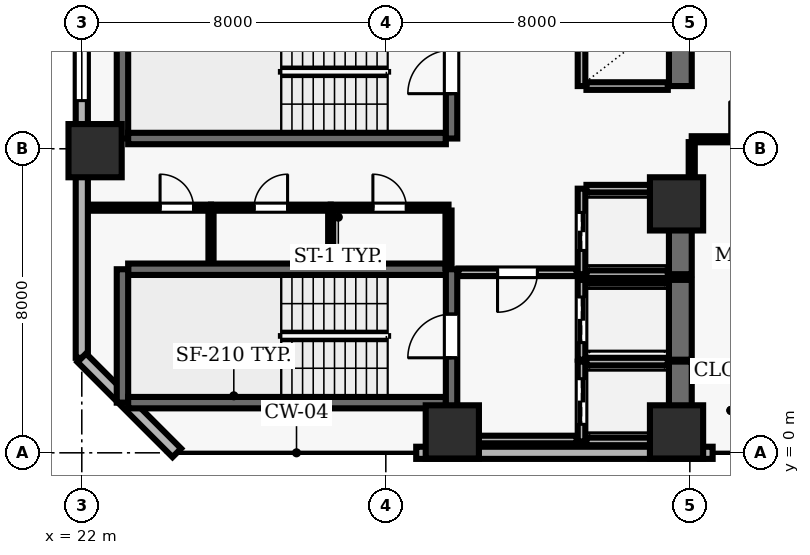
"""IFC4 building model, lengths in metres.
Left out: names, types, materials, properties, quantities, classifications, styles, units other than length and angle.
Written with IfcOpenShell. Run it as: python <this file> out.ifc"""

import sys

from ifc_helpers import new_model, si_unit, direction, frame, frame_2d, origin, origin_2d, place, context, subcontext, project, spatial, rectangle, extrude, element, fill, save


model = new_model("IFC4")
c1 = context("Model", 3, precision=1e-05, world=origin(), true_north=direction((0.0, 1.0)))
c2 = subcontext(c1, "Body", "Model", "MODEL_VIEW")
j1 = project(units=[si_unit("LENGTHUNIT", "METRE"), si_unit("PLANEANGLEUNIT", "RADIAN")], contexts=[c1])
p1 = place(None, origin())
s1 = spatial("IfcSite", under=j1, at=p1, CompositionType="ELEMENT")
p2 = place(p1, origin())
s2 = spatial("IfcBuilding", under=s1, at=p2, CompositionType="ELEMENT")
p3 = place(p2, frame((0.0, 0.0, 85.6)))
s3 = spatial("IfcBuildingStorey", under=s2, at=p3, CompositionType="ELEMENT", Elevation=85.6)
for number, where, z_axis, x_axis in (
    (1, (31.75, 0.55, 0.0), (0.0, 0.0, 1.0), (1.0, 0.0, 0.0)),
    (2, (37.65, 0.55, 0.0), (0.0, 0.0, 1.0), (1.0, 0.0, 0.0)),
    (3, (22.35, 7.95, 0.0), (0.0, 0.0, 1.0), (1.0, 0.0, 0.0)),
    (4, (37.65, 6.55, 0.0), (0.0, 0.0, 1.0), (1.0, 0.0, 0.0)),
):
    element("IfcColumn", number, at=place(p3, frame(where, z_axis=z_axis, x_axis=x_axis)), inside=s3, PredefinedType="COLUMN", context=c2, shape_type="SweptSolid", body=[
        extrude(rectangle(XDim=1.4, YDim=1.4, at=origin_2d()), origin(), (0.0, 0.0, 1.0), 3.9),
    ])
p4 = place(p3, frame((30.8, 0.0, 0.0), z_axis=(0.0, 0.0, 1.0), x_axis=(1.0, 0.0, 0.0)))
e5 = element("IfcWall", 5, at=p4, inside=s3, PredefinedType="SOLIDWALL", context=c2, shape_type="SweptSolid", body=[
    extrude(rectangle(XDim=7.8, YDim=0.32, at=frame_2d((3.9, 0.0))), origin(), (0.0, 0.0, 1.0), 3.69),
])
p5 = place(p3, frame((22.0, 51.5, 0.0), z_axis=(0.0, 0.0, 1.0), x_axis=(0.0, -1.0, 0.0)))
e6 = element("IfcWall", 6, at=p5, inside=s3, PredefinedType="SOLIDWALL", context=c2, shape_type="SweptSolid", body=[
    extrude(rectangle(XDim=49.0, YDim=0.32, at=frame_2d((24.5, 0.0))), origin(), (0.0, 0.0, 1.0), 3.69),
])
p6 = place(p5, frame((12.1, 0.0, 0.0)))
e7 = element("IfcOpeningElement", 7, at=p6, cuts=e6, PredefinedType="OPENING", context=c2, shape_type="SweptSolid", body=[
    extrude(rectangle(XDim=1.0, YDim=2.2, at=frame_2d((0.5, 1.1))), frame((0.0, 0.17, 0.0), z_axis=(0.0, -1.0, 0.0), x_axis=(1.0, 0.0, 0.0)), (0.0, 0.0, 1.0), 0.34),
])
p7 = place(p5, frame((1.322, 0.0, 0.9)))
e8 = element("IfcOpeningElement", 8, at=p7, cuts=e6, PredefinedType="OPENING", context=c2, shape_type="SweptSolid", body=[
    extrude(rectangle(XDim=2.8, YDim=1.8, at=frame_2d((1.4, 0.9))), frame((0.0, 0.17, 0.0), z_axis=(0.0, -1.0, 0.0), x_axis=(1.0, 0.0, 0.0)), (0.0, 0.0, 1.0), 0.34),
])
p8 = place(p5, frame((17.656, 0.0, 0.9)))
e9 = element("IfcOpeningElement", 9, at=p8, cuts=e6, PredefinedType="OPENING", context=c2, shape_type="SweptSolid", body=[
    extrude(rectangle(XDim=2.8, YDim=1.8, at=frame_2d((1.4, 0.9))), frame((0.0, 0.17, 0.0), z_axis=(0.0, -1.0, 0.0), x_axis=(1.0, 0.0, 0.0)), (0.0, 0.0, 1.0), 0.34),
])
p9 = place(p5, frame((28.994, 0.0, 0.9)))
e10 = element("IfcOpeningElement", 10, at=p9, cuts=e6, PredefinedType="OPENING", context=c2, shape_type="SweptSolid", body=[
    extrude(rectangle(XDim=2.8, YDim=1.8, at=frame_2d((1.4, 0.9))), frame((0.0, 0.17, 0.0), z_axis=(0.0, -1.0, 0.0), x_axis=(1.0, 0.0, 0.0)), (0.0, 0.0, 1.0), 0.34),
])
p10 = place(p5, frame((33.089, 0.0, 0.9)))
e11 = element("IfcOpeningElement", 11, at=p10, cuts=e6, PredefinedType="OPENING", context=c2, shape_type="SweptSolid", body=[
    extrude(rectangle(XDim=2.8, YDim=1.8, at=frame_2d((1.4, 0.9))), frame((0.0, 0.17, 0.0), z_axis=(0.0, -1.0, 0.0), x_axis=(1.0, 0.0, 0.0)), (0.0, 0.0, 1.0), 0.34),
])
p11 = place(p5, frame((39.433, 0.0, 0.9)))
e12 = element("IfcOpeningElement", 12, at=p11, cuts=e6, PredefinedType="OPENING", context=c2, shape_type="SweptSolid", body=[
    extrude(rectangle(XDim=2.8, YDim=1.8, at=frame_2d((1.4, 0.9))), frame((0.0, 0.17, 0.0), z_axis=(0.0, -1.0, 0.0), x_axis=(1.0, 0.0, 0.0)), (0.0, 0.0, 1.0), 0.34),
])
p12 = place(p3, frame((22.0, 2.5, 0.0), z_axis=(0.0, 0.0, 1.0), x_axis=(0.707106781187, -0.707106781187, 0.0)))
e13 = element("IfcWall", 13, at=p12, inside=s3, PredefinedType="SOLIDWALL", context=c2, shape_type="SweptSolid", body=[
    extrude(rectangle(XDim=3.536, YDim=0.32, at=frame_2d((1.768, 0.0))), origin(), (0.0, 0.0, 1.0), 3.69),
])
p13 = place(p3, frame((31.58, 4.83, 0.0), z_axis=(0.0, 0.0, 1.0), x_axis=(-1.0, 0.0, 0.0)))
e14 = element("IfcWall", 14, at=p13, inside=s3, PredefinedType="SHEAR", context=c2, shape_type="SweptSolid", body=[
    extrude(rectangle(XDim=8.36, YDim=0.3, at=frame_2d((4.18, 0.0))), origin(), (0.0, 0.0, 1.0), 3.69),
])
p14 = place(p3, frame((23.07, 4.83, 0.0), z_axis=(0.0, 0.0, 1.0), x_axis=(0.0, -1.0, 0.0)))
e15 = element("IfcWall", 15, at=p14, inside=s3, PredefinedType="SHEAR", context=c2, shape_type="SweptSolid", body=[
    extrude(rectangle(XDim=3.51, YDim=0.3, at=frame_2d((1.755, 0.0))), origin(), (0.0, 0.0, 1.0), 3.69),
])
p15 = place(p3, frame((23.22, 1.32, 0.0), z_axis=(0.0, 0.0, 1.0), x_axis=(1.0, 0.0, 0.0)))
e16 = element("IfcWall", 16, at=p15, inside=s3, PredefinedType="SHEAR", context=c2, shape_type="SweptSolid", body=[
    extrude(rectangle(XDim=8.36, YDim=0.3, at=frame_2d((4.18, 0.0))), origin(), (0.0, 0.0, 1.0), 3.69),
])
p16 = place(p3, frame((31.73, 0.96, 0.0), z_axis=(0.0, 0.0, 1.0), x_axis=(0.0, 1.0, 0.0)))
e17 = element("IfcWall", 17, at=p16, inside=s3, PredefinedType="SHEAR", context=c2, shape_type="SweptSolid", body=[
    extrude(rectangle(XDim=3.87, YDim=0.3, at=frame_2d((1.935, 0.0))), origin(), (0.0, 0.0, 1.0), 3.69),
])
p17 = place(p16, frame((1.54, 0.0, 0.0)))
e18 = element("IfcOpeningElement", 18, at=p17, cuts=e17, PredefinedType="OPENING", context=c2, shape_type="SweptSolid", body=[
    extrude(rectangle(XDim=1.15, YDim=2.15, at=frame_2d((0.575, 1.075))), frame((0.0, 0.16, 0.0), z_axis=(0.0, -1.0, 0.0), x_axis=(1.0, 0.0, 0.0)), (0.0, 0.0, 1.0), 0.32),
])
p18 = place(p3, frame((23.07, 11.78, 0.0), z_axis=(0.0, 0.0, 1.0), x_axis=(0.0, -1.0, 0.0)))
e19 = element("IfcWall", 19, at=p18, inside=s3, PredefinedType="SHEAR", context=c2, shape_type="SweptSolid", body=[
    extrude(rectangle(XDim=3.51, YDim=0.3, at=frame_2d((1.755, 0.0))), origin(), (0.0, 0.0, 1.0), 3.69),
])
p19 = place(p3, frame((23.22, 8.27, 0.0), z_axis=(0.0, 0.0, 1.0), x_axis=(1.0, 0.0, 0.0)))
e20 = element("IfcWall", 20, at=p19, inside=s3, PredefinedType="SHEAR", context=c2, shape_type="SweptSolid", body=[
    extrude(rectangle(XDim=8.36, YDim=0.3, at=frame_2d((4.18, 0.0))), origin(), (0.0, 0.0, 1.0), 3.69),
])
p20 = place(p3, frame((31.73, 8.27, 0.0), z_axis=(0.0, 0.0, 1.0), x_axis=(0.0, 1.0, 0.0)))
e21 = element("IfcWall", 21, at=p20, inside=s3, PredefinedType="SHEAR", context=c2, shape_type="SweptSolid", body=[
    extrude(rectangle(XDim=3.51, YDim=0.3, at=frame_2d((1.755, 0.0))), origin(), (0.0, 0.0, 1.0), 3.69),
])
p21 = place(p20, frame((1.18, 0.0, 0.0)))
e22 = element("IfcOpeningElement", 22, at=p21, cuts=e21, PredefinedType="OPENING", context=c2, shape_type="SweptSolid", body=[
    extrude(rectangle(XDim=1.15, YDim=2.15, at=frame_2d((0.575, 1.075))), frame((0.0, 0.16, 0.0), z_axis=(0.0, -1.0, 0.0), x_axis=(1.0, 0.0, 0.0)), (0.0, 0.0, 1.0), 0.32),
])
p22 = place(p3, frame((35.15, 2.4, 0.0), z_axis=(0.0, 0.0, 1.0), x_axis=(0.0, -1.0, 0.0)))
e23 = element("IfcWall", 23, at=p22, inside=s3, PredefinedType="SOLIDWALL", context=c2, shape_type="SweptSolid", body=[
    extrude(rectangle(XDim=2.1, YDim=0.2, at=frame_2d((1.05, 0.0))), origin(), (0.0, 0.0, 1.0), 3.69),
])
p23 = place(p22, frame((0.45, 0.0, 0.0)))
e24 = element("IfcOpeningElement", 24, at=p23, cuts=e23, PredefinedType="OPENING", context=c2, shape_type="SweptSolid", body=[
    extrude(rectangle(XDim=1.2, YDim=2.15, at=frame_2d((0.6, 1.075))), frame((0.0, 0.11, 0.0), z_axis=(0.0, -1.0, 0.0), x_axis=(1.0, 0.0, 0.0)), (0.0, 0.0, 1.0), 0.22),
])
p24 = place(p3, frame((37.75, 0.3, 0.0), z_axis=(0.0, 0.0, 1.0), x_axis=(0.0, 1.0, 0.0)))
e25 = element("IfcWall", 25, at=p24, inside=s3, PredefinedType="SHEAR", context=c2, shape_type="SweptSolid", body=[
    extrude(rectangle(XDim=2.1, YDim=0.6, at=frame_2d((1.05, 0.0))), origin(), (0.0, 0.0, 1.0), 3.69),
])
for number, where, z_axis, x_axis in (
    (26, (35.28, 0.3, 0.0), (0.0, 0.0, 1.0), (1.0, 0.0, 0.0)),
    (27, (37.42, 2.4, 0.0), (0.0, 0.0, 1.0), (-1.0, 0.0, 0.0)),
):
    element("IfcWall", number, at=place(p3, frame(where, z_axis=z_axis, x_axis=x_axis)), inside=s3, PredefinedType="SOLIDWALL", context=c2, shape_type="SweptSolid", body=[
        extrude(rectangle(XDim=2.14, YDim=0.2, at=frame_2d((1.07, 0.0))), origin(), (0.0, 0.0, 1.0), 3.69),
    ])
p25 = place(p3, frame((35.15, 4.55, 0.0), z_axis=(0.0, 0.0, 1.0), x_axis=(0.0, -1.0, 0.0)))
e28 = element("IfcWall", 28, at=p25, inside=s3, PredefinedType="SOLIDWALL", context=c2, shape_type="SweptSolid", body=[
    extrude(rectangle(XDim=2.1, YDim=0.2, at=frame_2d((1.05, 0.0))), origin(), (0.0, 0.0, 1.0), 3.69),
])
p26 = place(p25, frame((0.45, 0.0, 0.0)))
e29 = element("IfcOpeningElement", 29, at=p26, cuts=e28, PredefinedType="OPENING", context=c2, shape_type="SweptSolid", body=[
    extrude(rectangle(XDim=1.2, YDim=2.15, at=frame_2d((0.6, 1.075))), frame((0.0, 0.11, 0.0), z_axis=(0.0, -1.0, 0.0), x_axis=(1.0, 0.0, 0.0)), (0.0, 0.0, 1.0), 0.22),
])
p27 = place(p3, frame((37.75, 2.45, 0.0), z_axis=(0.0, 0.0, 1.0), x_axis=(0.0, 1.0, 0.0)))
e30 = element("IfcWall", 30, at=p27, inside=s3, PredefinedType="SHEAR", context=c2, shape_type="SweptSolid", body=[
    extrude(rectangle(XDim=2.1, YDim=0.6, at=frame_2d((1.05, 0.0))), origin(), (0.0, 0.0, 1.0), 3.69),
])
p28 = place(p3, frame((37.42, 4.55, 0.0), z_axis=(0.0, 0.0, 1.0), x_axis=(-1.0, 0.0, 0.0)))
e31 = element("IfcWall", 31, at=p28, inside=s3, PredefinedType="SOLIDWALL", context=c2, shape_type="SweptSolid", body=[
    extrude(rectangle(XDim=2.14, YDim=0.2, at=frame_2d((1.07, 0.0))), origin(), (0.0, 0.0, 1.0), 3.69),
])
p29 = place(p3, frame((35.15, 6.95, 0.0), z_axis=(0.0, 0.0, 1.0), x_axis=(0.0, -1.0, 0.0)))
e32 = element("IfcWall", 32, at=p29, inside=s3, PredefinedType="SOLIDWALL", context=c2, shape_type="SweptSolid", body=[
    extrude(rectangle(XDim=2.25, YDim=0.2, at=frame_2d((1.125, 0.0))), origin(), (0.0, 0.0, 1.0), 3.69),
])
p30 = place(p29, frame((0.625, 0.0, 0.0)))
e33 = element("IfcOpeningElement", 33, at=p30, cuts=e32, PredefinedType="OPENING", context=c2, shape_type="SweptSolid", body=[
    extrude(rectangle(XDim=1.0, YDim=2.1, at=frame_2d((0.5, 1.05))), frame((0.0, 0.11, 0.0), z_axis=(0.0, -1.0, 0.0), x_axis=(1.0, 0.0, 0.0)), (0.0, 0.0, 1.0), 0.22),
])
p31 = place(p3, frame((37.75, 4.7, 0.0), z_axis=(0.0, 0.0, 1.0), x_axis=(0.0, 1.0, 0.0)))
e34 = element("IfcWall", 34, at=p31, inside=s3, PredefinedType="SHEAR", context=c2, shape_type="SweptSolid", body=[
    extrude(rectangle(XDim=2.25, YDim=0.6, at=frame_2d((1.125, 0.0))), origin(), (0.0, 0.0, 1.0), 3.69),
])
for number, where, z_axis, x_axis in (
    (35, (35.28, 4.7, 0.0), (0.0, 0.0, 1.0), (1.0, 0.0, 0.0)),
    (36, (37.42, 6.95, 0.0), (0.0, 0.0, 1.0), (-1.0, 0.0, 0.0)),
):
    element("IfcWall", number, at=place(p3, frame(where, z_axis=z_axis, x_axis=x_axis)), inside=s3, PredefinedType="SOLIDWALL", context=c2, shape_type="SweptSolid", body=[
        extrude(rectangle(XDim=2.14, YDim=0.2, at=frame_2d((1.07, 0.0))), origin(), (0.0, 0.0, 1.0), 3.69),
    ])
p32 = place(p3, frame((35.15, 11.55, 0.0), z_axis=(0.0, 0.0, 1.0), x_axis=(0.0, -1.0, 0.0)))
e37 = element("IfcWall", 37, at=p32, inside=s3, PredefinedType="SOLIDWALL", context=c2, shape_type="SweptSolid", body=[
    extrude(rectangle(XDim=1.9, YDim=0.2, at=frame_2d((0.95, 0.0))), origin(), (0.0, 0.0, 1.0), 3.69),
])
p33 = place(p3, frame((37.75, 9.65, 0.0), z_axis=(0.0, 0.0, 1.0), x_axis=(0.0, 1.0, 0.0)))
e38 = element("IfcWall", 38, at=p33, inside=s3, PredefinedType="SHEAR", context=c2, shape_type="SweptSolid", body=[
    extrude(rectangle(XDim=1.9, YDim=0.6, at=frame_2d((0.95, 0.0))), origin(), (0.0, 0.0, 1.0), 3.69),
])
p34 = place(p3, frame((35.28, 9.65, 0.0), z_axis=(0.0, 0.0, 1.0), x_axis=(1.0, 0.0, 0.0)))
e39 = element("IfcWall", 39, at=p34, inside=s3, PredefinedType="SOLIDWALL", context=c2, shape_type="SweptSolid", body=[
    extrude(rectangle(XDim=2.14, YDim=0.2, at=frame_2d((1.07, 0.0))), origin(), (0.0, 0.0, 1.0), 3.69),
])
p35 = place(p3, frame((22.2, 6.45, 0.0), z_axis=(0.0, 0.0, 1.0), x_axis=(1.0, 0.0, 0.0)))
e40 = element("IfcWall", 40, at=p35, inside=s3, PredefinedType="PARTITIONING", context=c2, shape_type="SweptSolid", body=[
    extrude(rectangle(XDim=3.2, YDim=0.16, at=frame_2d((1.6, 0.0))), origin(), (0.0, 0.0, 1.0), 3.69),
])
p36 = place(p35, frame((1.86, 0.0, 0.0)))
e41 = element("IfcOpeningElement", 41, at=p36, cuts=e40, PredefinedType="OPENING", context=c2, shape_type="SweptSolid", body=[
    extrude(rectangle(XDim=0.88, YDim=2.1, at=frame_2d((0.44, 1.05))), frame((0.0, 0.09, 0.0), z_axis=(0.0, -1.0, 0.0), x_axis=(1.0, 0.0, 0.0)), (0.0, 0.0, 1.0), 0.18),
])
p37 = place(p3, frame((25.4, 6.45, 0.0), z_axis=(0.0, 0.0, 1.0), x_axis=(1.0, 0.0, 0.0)))
e42 = element("IfcWall", 42, at=p37, inside=s3, PredefinedType="PARTITIONING", context=c2, shape_type="SweptSolid", body=[
    extrude(rectangle(XDim=3.15, YDim=0.16, at=frame_2d((1.575, 0.0))), origin(), (0.0, 0.0, 1.0), 3.69),
])
p38 = place(p37, frame((1.135, 0.0, 0.0)))
e43 = element("IfcOpeningElement", 43, at=p38, cuts=e42, PredefinedType="OPENING", context=c2, shape_type="SweptSolid", body=[
    extrude(rectangle(XDim=0.88, YDim=2.1, at=frame_2d((0.44, 1.05))), frame((0.0, 0.09, 0.0), z_axis=(0.0, -1.0, 0.0), x_axis=(1.0, 0.0, 0.0)), (0.0, 0.0, 1.0), 0.18),
])
p39 = place(p3, frame((28.55, 6.45, 0.0), z_axis=(0.0, 0.0, 1.0), x_axis=(1.0, 0.0, 0.0)))
e44 = element("IfcWall", 44, at=p39, inside=s3, PredefinedType="PARTITIONING", context=c2, shape_type="SweptSolid", body=[
    extrude(rectangle(XDim=3.1, YDim=0.16, at=frame_2d((1.55, 0.0))), origin(), (0.0, 0.0, 1.0), 3.69),
])
p40 = place(p39, frame((1.11, 0.0, 0.0)))
e45 = element("IfcOpeningElement", 45, at=p40, cuts=e44, PredefinedType="OPENING", context=c2, shape_type="SweptSolid", body=[
    extrude(rectangle(XDim=0.88, YDim=2.1, at=frame_2d((0.44, 1.05))), frame((0.0, 0.09, 0.0), z_axis=(0.0, -1.0, 0.0), x_axis=(1.0, 0.0, 0.0)), (0.0, 0.0, 1.0), 0.18),
])
p41 = place(p3, frame((31.65, 0.35, 0.0), z_axis=(0.0, 0.0, 1.0), x_axis=(1.0, 0.0, 0.0)))
e46 = element("IfcWall", 46, at=p41, inside=s3, PredefinedType="SOLIDWALL", context=c2, shape_type="SweptSolid", body=[
    extrude(rectangle(XDim=3.37, YDim=0.2, at=frame_2d((1.685, 0.0))), origin(), (0.0, 0.0, 1.0), 3.69),
])
p42 = place(p3, frame((35.02, 4.75, 0.0), z_axis=(0.0, 0.0, 1.0), x_axis=(-1.0, 0.0, 0.0)))
e47 = element("IfcWall", 47, at=p42, inside=s3, PredefinedType="SOLIDWALL", context=c2, shape_type="SweptSolid", body=[
    extrude(rectangle(XDim=3.11, YDim=0.2, at=frame_2d((1.555, 0.0))), origin(), (0.0, 0.0, 1.0), 3.69),
])
p43 = place(p42, frame((1.03, 0.0, 0.0)))
e48 = element("IfcOpeningElement", 48, at=p43, cuts=e47, PredefinedType="OPENING", context=c2, shape_type="SweptSolid", body=[
    extrude(rectangle(XDim=1.05, YDim=2.15, at=frame_2d((0.525, 1.075))), frame((0.0, 0.11, 0.0), z_axis=(0.0, -1.0, 0.0), x_axis=(1.0, 0.0, 0.0)), (0.0, 0.0, 1.0), 0.22),
])
p44 = place(p3, frame((38.05, 8.25, 0.0), z_axis=(0.0, 0.0, 1.0), x_axis=(1.0, 0.0, 0.0)))
e49 = element("IfcWall", 49, at=p44, inside=s3, PredefinedType="PARTITIONING", context=c2, shape_type="SweptSolid", body=[
    extrude(rectangle(XDim=2.3, YDim=0.16, at=frame_2d((1.15, 0.0))), origin(), (0.0, 0.0, 1.0), 2.995),
])
p45 = place(p44, frame((1.0, 0.0, 0.0)))
e50 = element("IfcOpeningElement", 50, at=p45, cuts=e49, PredefinedType="OPENING", context=c2, shape_type="SweptSolid", body=[
    extrude(rectangle(XDim=1.0, YDim=2.1, at=frame_2d((0.5, 1.05))), frame((0.0, 0.09, 0.0), z_axis=(0.0, -1.0, 0.0), x_axis=(1.0, 0.0, 0.0)), (0.0, 0.0, 1.0), 0.18),
])
for number, where, z_axis, x_axis in (
    (51, (25.4, 5.01, 0.0), (0.0, 0.0, 1.0), (0.0, 1.0, 0.0)),
    (52, (28.55, 5.01, 0.0), (0.0, 0.0, 1.0), (0.0, 1.0, 0.0)),
):
    element("IfcWall", number, at=place(p3, frame(where, z_axis=z_axis, x_axis=x_axis)), inside=s3, PredefinedType="PARTITIONING", context=c2, shape_type="SweptSolid", body=[
        extrude(rectangle(XDim=1.365, YDim=0.135, at=frame_2d((0.683, 0.0))), origin(), (0.0, 0.0, 1.0), 3.69),
    ])
p46 = place(p3, frame((31.65, 4.86, 0.0), z_axis=(0.0, 0.0, 1.0), x_axis=(0.0, 1.0, 0.0)))
e53 = element("IfcWall", 53, at=p46, inside=s3, PredefinedType="PARTITIONING", context=c2, shape_type="SweptSolid", body=[
    extrude(rectangle(XDim=1.515, YDim=0.16, at=frame_2d((0.757, 0.0))), origin(), (0.0, 0.0, 1.0), 3.69),
])
p47 = place(p3, frame((38.05, 7.05, 0.0), z_axis=(0.0, 0.0, 1.0), x_axis=(0.0, 1.0, 0.0)))
e54 = element("IfcWall", 54, at=p47, inside=s3, PredefinedType="PARTITIONING", context=c2, shape_type="SweptSolid", body=[
    extrude(rectangle(XDim=1.125, YDim=0.16, at=frame_2d((0.562, 0.0))), origin(), (0.0, 0.0, 1.0), 2.995),
])
p48 = place(p11, origin())
e55 = element("IfcWindow", 55, at=p48, inside=s3, PartitioningType="SINGLE_PANEL", PredefinedType="WINDOW", context=c2, shape_type="SweptSolid", body=[
    extrude(rectangle(XDim=2.8, YDim=1.8, at=frame_2d((1.4, 0.9))), frame((0.0, 0.03, 0.0), z_axis=(0.0, -1.0, 0.0), x_axis=(1.0, 0.0, 0.0)), (0.0, 0.0, 1.0), 0.06),
])
fill(e12, e55)
p49 = place(p17, origin())
e56 = element("IfcDoor", 56, at=p49, inside=s3, OperationType="SINGLE_SWING_LEFT", PredefinedType="DOOR", context=c2, shape_type="SweptSolid", body=[
    extrude(rectangle(XDim=1.15, YDim=2.15, at=frame_2d((0.575, 1.075))), frame((0.0, 0.025, 0.0), z_axis=(0.0, -1.0, 0.0), x_axis=(1.0, 0.0, 0.0)), (0.0, 0.0, 1.0), 0.05),
])
fill(e18, e56)
p50 = place(p21, origin())
e57 = element("IfcDoor", 57, at=p50, inside=s3, OperationType="SINGLE_SWING_LEFT", PredefinedType="DOOR", context=c2, shape_type="SweptSolid", body=[
    extrude(rectangle(XDim=1.15, YDim=2.15, at=frame_2d((0.575, 1.075))), frame((0.0, 0.025, 0.0), z_axis=(0.0, -1.0, 0.0), x_axis=(1.0, 0.0, 0.0)), (0.0, 0.0, 1.0), 0.05),
])
fill(e22, e57)
p51 = place(p23, origin())
e58 = element("IfcDoor", 58, at=p51, inside=s3, OperationType="DOUBLE_DOOR_SLIDING", PredefinedType="DOOR", context=c2, shape_type="SweptSolid", body=[
    extrude(rectangle(XDim=1.2, YDim=2.15, at=frame_2d((0.6, 1.075))), frame((0.0, 0.025, 0.0), z_axis=(0.0, -1.0, 0.0), x_axis=(1.0, 0.0, 0.0)), (0.0, 0.0, 1.0), 0.05),
])
fill(e24, e58)
p52 = place(p26, origin())
e59 = element("IfcDoor", 59, at=p52, inside=s3, OperationType="DOUBLE_DOOR_SLIDING", PredefinedType="DOOR", context=c2, shape_type="SweptSolid", body=[
    extrude(rectangle(XDim=1.2, YDim=2.15, at=frame_2d((0.6, 1.075))), frame((0.0, 0.025, 0.0), z_axis=(0.0, -1.0, 0.0), x_axis=(1.0, 0.0, 0.0)), (0.0, 0.0, 1.0), 0.05),
])
fill(e29, e59)
p53 = place(p30, origin())
e60 = element("IfcDoor", 60, at=p53, inside=s3, OperationType="DOUBLE_DOOR_SLIDING", PredefinedType="DOOR", context=c2, shape_type="SweptSolid", body=[
    extrude(rectangle(XDim=1.0, YDim=2.1, at=frame_2d((0.5, 1.05))), frame((0.0, 0.025, 0.0), z_axis=(0.0, -1.0, 0.0), x_axis=(1.0, 0.0, 0.0)), (0.0, 0.0, 1.0), 0.05),
])
fill(e33, e60)
p54 = place(p43, origin())
e61 = element("IfcDoor", 61, at=p54, inside=s3, OperationType="SINGLE_SWING_RIGHT", PredefinedType="DOOR", context=c2, shape_type="SweptSolid", body=[
    extrude(rectangle(XDim=1.05, YDim=2.15, at=frame_2d((0.525, 1.075))), frame((0.0, 0.025, 0.0), z_axis=(0.0, -1.0, 0.0), x_axis=(1.0, 0.0, 0.0)), (0.0, 0.0, 1.0), 0.05),
])
fill(e48, e61)
p55 = place(p36, origin())
e62 = element("IfcDoor", 62, at=p55, inside=s3, OperationType="SINGLE_SWING_LEFT", PredefinedType="DOOR", context=c2, shape_type="SweptSolid", body=[
    extrude(rectangle(XDim=0.88, YDim=2.1, at=frame_2d((0.44, 1.05))), frame((0.0, 0.025, 0.0), z_axis=(0.0, -1.0, 0.0), x_axis=(1.0, 0.0, 0.0)), (0.0, 0.0, 1.0), 0.05),
])
fill(e41, e62)
p56 = place(p38, origin())
e63 = element("IfcDoor", 63, at=p56, inside=s3, OperationType="SINGLE_SWING_RIGHT", PredefinedType="DOOR", context=c2, shape_type="SweptSolid", body=[
    extrude(rectangle(XDim=0.88, YDim=2.1, at=frame_2d((0.44, 1.05))), frame((0.0, 0.025, 0.0), z_axis=(0.0, -1.0, 0.0), x_axis=(1.0, 0.0, 0.0)), (0.0, 0.0, 1.0), 0.05),
])
fill(e43, e63)
p57 = place(p40, origin())
e64 = element("IfcDoor", 64, at=p57, inside=s3, OperationType="SINGLE_SWING_LEFT", PredefinedType="DOOR", context=c2, shape_type="SweptSolid", body=[
    extrude(rectangle(XDim=0.88, YDim=2.1, at=frame_2d((0.44, 1.05))), frame((0.0, 0.025, 0.0), z_axis=(0.0, -1.0, 0.0), x_axis=(1.0, 0.0, 0.0)), (0.0, 0.0, 1.0), 0.05),
])
fill(e45, e64)
save(model, sys.argv[1])
